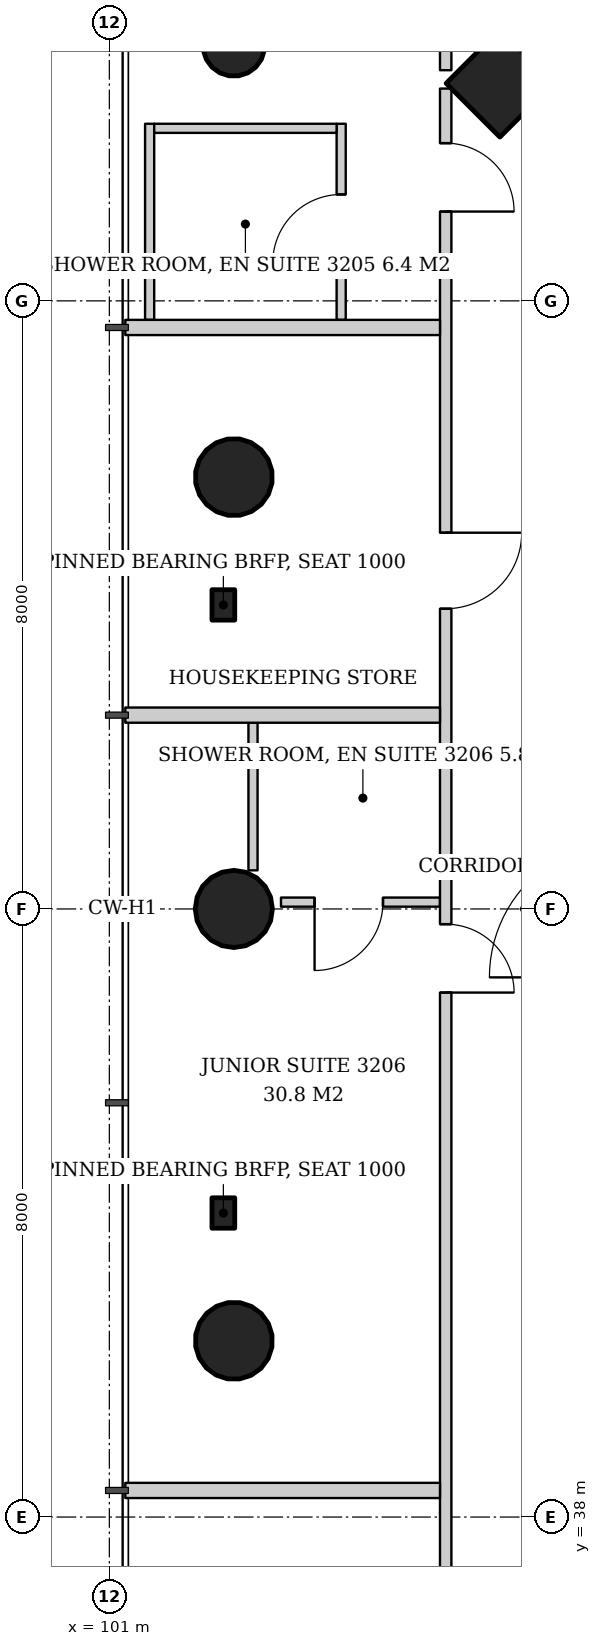
"""IFC4 building model, lengths in metres.
Left out: names, types, materials, properties, quantities, classifications, styles, units other than length and angle.
Written with IfcOpenShell. Run it as: python <this file> out.ifc"""

import sys

from ifc_helpers import new_model, si_unit, direction, frame, frame_2d, origin, origin_2d, place, context, subcontext, project, spatial, rectangle, hollow_circle, extrude, element, fill, save


model = new_model("IFC4")
c1 = context("Model", 3, precision=1e-05, world=origin(), true_north=direction((0.0, 1.0)))
c2 = subcontext(c1, "Body", "Model", "MODEL_VIEW")
j1 = project(units=[si_unit("LENGTHUNIT", "METRE"), si_unit("PLANEANGLEUNIT", "RADIAN")], contexts=[c1])
p1 = place(None, origin())
s1 = spatial("IfcSite", under=j1, at=p1, CompositionType="ELEMENT")
p2 = place(p1, origin())
s2 = spatial("IfcBuilding", under=s1, at=p2, CompositionType="ELEMENT")
p3 = place(p2, frame((0.0, 0.0, 127.4)))
s3 = spatial("IfcBuildingStorey", under=s2, at=p3, CompositionType="ELEMENT", Elevation=127.4)
p4 = place(p3, frame((106.086, 56.914, 0.0), z_axis=(0.043029647111, -0.043029647111, 0.998146732169), x_axis=(0.707106781187, 0.707106781187, 0.0)))
e1 = element("IfcColumn", 1, at=p4, inside=s3, PredefinedType="COLUMN", context=c2, shape_type="SweptSolid", body=[
    extrude(rectangle(XDim=1.0, YDim=1.0, at=origin_2d()), origin(), (0.0, 0.0, 1.0), 3.807),
])
p5 = place(p3, frame((102.586, 57.414, 0.0), z_axis=(0.043029647111, -0.043029647111, 0.998146732169), x_axis=(0.707106781187, 0.707106781187, 0.0)))
e2 = element("IfcColumn", 2, at=p5, inside=s3, PredefinedType="COLUMN", context=c2, shape_type="SweptSolid", body=[
    extrude(hollow_circle(Radius=0.406, WallThickness=0.03, at=origin_2d()), origin(), (0.0, 0.0, 1.0), 3.807),
])
p6 = place(p3, frame((102.586, 51.707, 0.0), z_axis=(0.043059584825, -0.021497706284, 0.998841188968), x_axis=(0.446680166538, 0.894693706707, 0.0)))
e3 = element("IfcColumn", 3, at=p6, inside=s3, PredefinedType="COLUMN", context=c2, shape_type="SweptSolid", body=[
    extrude(hollow_circle(Radius=0.508, WallThickness=0.04, at=origin_2d()), origin(), (0.0, 0.0, 1.0), 3.804),
])
p7 = place(p3, frame((102.586, 46.0, 0.0), z_axis=(0.043069538298, 0.0, 0.999072076915), x_axis=(0.0, 1.0, 0.0)))
e4 = element("IfcColumn", 4, at=p7, inside=s3, PredefinedType="COLUMN", context=c2, shape_type="SweptSolid", body=[
    extrude(hollow_circle(Radius=0.508, WallThickness=0.04, at=origin_2d()), origin(), (0.0, 0.0, 1.0), 3.803),
])
p8 = place(p3, frame((102.586, 40.293, 0.0), z_axis=(0.043059584825, 0.021497706284, 0.998841188968), x_axis=(-0.446680166538, 0.894693706707, 0.0)))
e5 = element("IfcColumn", 5, at=p8, inside=s3, PredefinedType="COLUMN", context=c2, shape_type="SweptSolid", body=[
    extrude(hollow_circle(Radius=0.508, WallThickness=0.04, at=origin_2d()), origin(), (0.0, 0.0, 1.0), 3.804),
])
for number, where, z_axis, x_axis in (
    (6, (102.5, 42.0, 0.0), (0.0, 0.0, 1.0), (1.0, 0.0, 0.0)),
    (7, (102.5, 50.0, 0.0), (0.0, 0.0, 1.0), (1.0, 0.0, 0.0)),
):
    element("IfcColumn", number, at=place(p3, frame(where, z_axis=z_axis, x_axis=x_axis)), inside=s3, PredefinedType="COLUMN", context=c2, shape_type="SweptSolid", body=[
        extrude(rectangle(XDim=0.3, YDim=0.4, at=origin_2d()), origin(), (0.0, 0.0, 1.0), 2.548),
    ])
p9 = place(p3, frame((104.05, 53.75, 0.0), z_axis=(0.0, 0.0, 1.0), x_axis=(0.0, 1.0, 0.0)))
e8 = element("IfcWall", 8, at=p9, inside=s3, PredefinedType="PARTITIONING", context=c2, shape_type="SweptSolid", body=[
    extrude(rectangle(XDim=2.58, YDim=0.12, at=frame_2d((1.29, 0.0))), origin(), (0.0, 0.0, 1.0), 2.338),
])
p10 = place(p9, frame((0.75, 0.0, 0.0)))
e9 = element("IfcOpeningElement", 9, at=p10, cuts=e8, PredefinedType="OPENING", context=c2, shape_type="SweptSolid", body=[
    extrude(rectangle(XDim=0.9, YDim=2.1, at=frame_2d((0.45, 1.05))), frame((0.0, 0.07, 0.0), z_axis=(0.0, -1.0, 0.0), x_axis=(1.0, 0.0, 0.0)), (0.0, 0.0, 1.0), 0.14),
])
p11 = place(p3, frame((101.53, 53.75, 0.0), z_axis=(0.0, 0.0, 1.0), x_axis=(0.0, 1.0, 0.0)))
e10 = element("IfcWall", 10, at=p11, inside=s3, PredefinedType="PARTITIONING", context=c2, shape_type="SweptSolid", body=[
    extrude(rectangle(XDim=2.58, YDim=0.12, at=frame_2d((1.29, 0.0))), origin(), (0.0, 0.0, 1.0), 3.35),
])
p12 = place(p3, frame((103.99, 56.27, 0.0), z_axis=(0.0, 0.0, 1.0), x_axis=(-1.0, 0.0, 0.0)))
e11 = element("IfcWall", 11, at=p12, inside=s3, PredefinedType="PARTITIONING", context=c2, shape_type="SweptSolid", body=[
    extrude(rectangle(XDim=2.4, YDim=0.12, at=frame_2d((1.2, 0.0))), origin(), (0.0, 0.0, 1.0), 2.35),
])
p13 = place(p3, frame((102.89, 48.45, 0.0), z_axis=(0.0, 0.0, 1.0), x_axis=(0.0, -1.0, 0.0)))
e12 = element("IfcWall", 12, at=p13, inside=s3, PredefinedType="PARTITIONING", context=c2, shape_type="SweptSolid", body=[
    extrude(rectangle(XDim=1.942, YDim=0.12, at=frame_2d((0.971, 0.0))), origin(), (0.0, 0.0, 1.0), 2.35),
])
p14 = place(p3, frame((105.35, 46.09, 0.0), z_axis=(0.0, 0.0, 1.0), x_axis=(-1.0, 0.0, 0.0)))
e13 = element("IfcWall", 13, at=p14, inside=s3, PredefinedType="PARTITIONING", context=c2, shape_type="SweptSolid", body=[
    extrude(rectangle(XDim=2.092, YDim=0.12, at=frame_2d((1.046, 0.0))), origin(), (0.0, 0.0, 1.0), 3.35),
])
p15 = place(p14, frame((0.75, 0.0, 0.0)))
e14 = element("IfcOpeningElement", 14, at=p15, cuts=e13, PredefinedType="OPENING", context=c2, shape_type="SweptSolid", body=[
    extrude(rectangle(XDim=0.9, YDim=2.1, at=frame_2d((0.45, 1.05))), frame((0.0, 0.07, 0.0), z_axis=(0.0, -1.0, 0.0), x_axis=(1.0, 0.0, 0.0)), (0.0, 0.0, 1.0), 0.14),
])
p16 = place(p3, frame((105.425, 57.65, 0.0), z_axis=(0.0, 0.0, 1.0), x_axis=(0.0, -1.0, 0.0)))
e15 = element("IfcWall", 15, at=p16, inside=s3, PredefinedType="PARTITIONING", context=c2, shape_type="SweptSolid", body=[
    extrude(rectangle(XDim=0.615, YDim=0.15, at=frame_2d((0.308, 0.0))), origin(), (0.0, 0.0, 1.0), 3.35),
])
p17 = place(p3, frame((105.425, 56.793, 0.0), z_axis=(0.0, 0.0, 1.0), x_axis=(0.0, -1.0, 0.0)))
e16 = element("IfcWall", 16, at=p17, inside=s3, PredefinedType="PARTITIONING", context=c2, shape_type="SweptSolid", body=[
    extrude(rectangle(XDim=21.586, YDim=0.15, at=frame_2d((10.793, 0.0))), origin(), (0.0, 0.0, 1.0), 2.338),
])
p18 = place(p17, frame((0.718, 0.0, 0.0)))
e17 = element("IfcOpeningElement", 17, at=p18, cuts=e16, PredefinedType="OPENING", context=c2, shape_type="SweptSolid", body=[
    extrude(rectangle(XDim=0.9, YDim=2.1, at=frame_2d((0.45, 1.05))), frame((0.0, 0.085, 0.0), z_axis=(0.0, -1.0, 0.0), x_axis=(1.0, 0.0, 0.0)), (0.0, 0.0, 1.0), 0.17),
])
p19 = place(p17, frame((5.843, 0.0, 0.0)))
e18 = element("IfcOpeningElement", 18, at=p19, cuts=e16, PredefinedType="OPENING", context=c2, shape_type="SweptSolid", body=[
    extrude(rectangle(XDim=1.0, YDim=2.1, at=frame_2d((0.5, 1.05))), frame((0.0, 0.085, 0.0), z_axis=(0.0, -1.0, 0.0), x_axis=(1.0, 0.0, 0.0)), (0.0, 0.0, 1.0), 0.17),
])
p20 = place(p17, frame((10.993, 0.0, 0.0)))
e19 = element("IfcOpeningElement", 19, at=p20, cuts=e16, PredefinedType="OPENING", context=c2, shape_type="SweptSolid", body=[
    extrude(rectangle(XDim=0.9, YDim=2.1, at=frame_2d((0.45, 1.05))), frame((0.0, 0.085, 0.0), z_axis=(0.0, -1.0, 0.0), x_axis=(1.0, 0.0, 0.0)), (0.0, 0.0, 1.0), 0.17),
])
for number, where, z_axis, x_axis in (
    (20, (105.35, 53.65, 0.0), (0.0, 0.0, 1.0), (-1.0, 0.0, 0.0)),
    (21, (105.35, 48.55, 0.0), (0.0, 0.0, 1.0), (-1.0, 0.0, 0.0)),
    (22, (105.35, 38.35, 0.0), (0.0, 0.0, 1.0), (-1.0, 0.0, 0.0)),
):
    element("IfcWall", number, at=place(p3, frame(where, z_axis=z_axis, x_axis=x_axis)), inside=s3, PredefinedType="PARTITIONING", context=c2, shape_type="SweptSolid", body=[
        extrude(rectangle(XDim=4.14, YDim=0.2, at=frame_2d((2.07, 0.0))), origin(), (0.0, 0.0, 1.0), 2.35),
    ])
p21 = place(p10, origin())
e23 = element("IfcDoor", 23, at=p21, inside=s3, OperationType="SINGLE_SWING_LEFT", PredefinedType="DOOR", context=c2, shape_type="SweptSolid", body=[
    extrude(rectangle(XDim=0.9, YDim=2.1, at=frame_2d((0.45, 1.05))), frame((0.0, 0.025, 0.0), z_axis=(0.0, -1.0, 0.0), x_axis=(1.0, 0.0, 0.0)), (0.0, 0.0, 1.0), 0.05),
])
fill(e9, e23)
p22 = place(p15, origin())
e24 = element("IfcDoor", 24, at=p22, inside=s3, OperationType="SINGLE_SWING_RIGHT", PredefinedType="DOOR", context=c2, shape_type="SweptSolid", body=[
    extrude(rectangle(XDim=0.9, YDim=2.1, at=frame_2d((0.45, 1.05))), frame((0.0, 0.025, 0.0), z_axis=(0.0, -1.0, 0.0), x_axis=(1.0, 0.0, 0.0)), (0.0, 0.0, 1.0), 0.05),
])
fill(e14, e24)
p23 = place(p18, origin())
e25 = element("IfcDoor", 25, at=p23, inside=s3, OperationType="SINGLE_SWING_RIGHT", PredefinedType="DOOR", context=c2, shape_type="SweptSolid", body=[
    extrude(rectangle(XDim=0.9, YDim=2.1, at=frame_2d((0.45, 1.05))), frame((0.0, 0.025, 0.0), z_axis=(0.0, -1.0, 0.0), x_axis=(1.0, 0.0, 0.0)), (0.0, 0.0, 1.0), 0.05),
])
fill(e17, e25)
p24 = place(p19, origin())
e26 = element("IfcDoor", 26, at=p24, inside=s3, OperationType="SINGLE_SWING_LEFT", PredefinedType="DOOR", context=c2, shape_type="SweptSolid", body=[
    extrude(rectangle(XDim=1.0, YDim=2.1, at=frame_2d((0.5, 1.05))), frame((0.0, 0.025, 0.0), z_axis=(0.0, -1.0, 0.0), x_axis=(1.0, 0.0, 0.0)), (0.0, 0.0, 1.0), 0.05),
])
fill(e18, e26)
p25 = place(p20, origin())
e27 = element("IfcDoor", 27, at=p25, inside=s3, OperationType="SINGLE_SWING_RIGHT", PredefinedType="DOOR", context=c2, shape_type="SweptSolid", body=[
    extrude(rectangle(XDim=0.9, YDim=2.1, at=frame_2d((0.45, 1.05))), frame((0.0, 0.025, 0.0), z_axis=(0.0, -1.0, 0.0), x_axis=(1.0, 0.0, 0.0)), (0.0, 0.0, 1.0), 0.05),
])
fill(e19, e27)
save(model, sys.argv[1])
